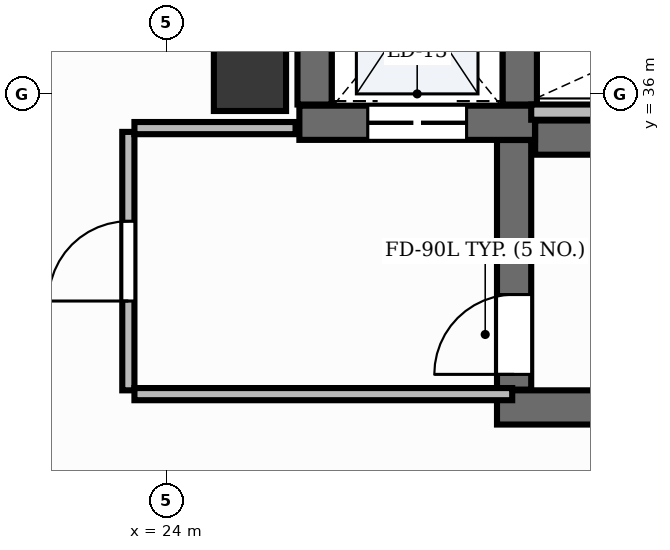
"""IFC4 building model, lengths in metres.
Left out: names, types, materials, properties, quantities, classifications, styles, units other than length and angle.
Written with IfcOpenShell. Run it as: python <this file> out.ifc"""

import sys

from ifc_helpers import new_model, si_unit, direction, frame, frame_2d, origin, origin_2d, place, context, subcontext, project, spatial, rectangle, extrude, element, fill, save


model = new_model("IFC4")
c1 = context("Model", 3, precision=1e-05, world=origin(), true_north=direction((0.0, 1.0)))
c2 = subcontext(c1, "Body", "Model", "MODEL_VIEW")
j1 = project(units=[si_unit("LENGTHUNIT", "METRE"), si_unit("PLANEANGLEUNIT", "RADIAN")], contexts=[c1])
p1 = place(None, origin())
s1 = spatial("IfcSite", under=j1, at=p1, CompositionType="ELEMENT")
p2 = place(p1, origin())
s2 = spatial("IfcBuilding", under=s1, at=p2, CompositionType="ELEMENT")
p3 = place(p2, frame((0.0, 0.0, 123.6)))
s3 = spatial("IfcBuildingStorey", under=s2, at=p3, CompositionType="ELEMENT", Elevation=123.6)
p4 = place(p3, frame((28.852, 35.425, 0.0), z_axis=(0.0, 0.0, 1.0), x_axis=(1.0, 0.0, 0.0)))
e1 = element("IfcWall", 1, at=p4, inside=s3, PredefinedType="SHEAR", context=c2, shape_type="SweptSolid", body=[
    extrude(rectangle(XDim=8.248, YDim=0.45, at=frame_2d((4.124, 0.0))), origin(), (0.0, 0.0, 1.0), 3.9),
])
p5 = place(p3, frame((28.35, 31.875, 0.0), z_axis=(0.0, 0.0, 1.0), x_axis=(1.0, 0.0, 0.0)))
e2 = element("IfcWall", 2, at=p5, inside=s3, PredefinedType="SHEAR", context=c2, shape_type="SweptSolid", body=[
    extrude(rectangle(XDim=8.75, YDim=0.45, at=frame_2d((4.375, 0.0))), origin(), (0.0, 0.0, 1.0), 3.9),
])
p6 = place(p3, frame((28.575, 32.11, 0.0), z_axis=(0.0, 0.0, 1.0), x_axis=(0.0, 1.0, 0.0)))
e3 = element("IfcWall", 3, at=p6, inside=s3, PredefinedType="SHEAR", context=c2, shape_type="SweptSolid", body=[
    extrude(rectangle(XDim=3.283, YDim=0.45, at=frame_2d((1.642, 0.0))), origin(), (0.0, 0.0, 1.0), 3.9),
])
p7 = place(p6, frame((0.2, 0.0, 0.0)))
e4 = element("IfcOpeningElement", 4, at=p7, cuts=e3, PredefinedType="OPENING", context=c2, shape_type="SweptSolid", body=[
    extrude(rectangle(XDim=1.05, YDim=2.15, at=frame_2d((0.525, 1.075))), frame((0.0, 0.24, 0.0), z_axis=(0.0, -1.0, 0.0), x_axis=(1.0, 0.0, 0.0)), (0.0, 0.0, 1.0), 0.48),
])
p8 = place(p3, frame((25.75, 35.62, 0.0), z_axis=(0.0, 0.0, 1.0), x_axis=(1.0, 0.0, 0.0)))
e5 = element("IfcWall", 5, at=p8, inside=s3, PredefinedType="SHEAR", context=c2, shape_type="SweptSolid", body=[
    extrude(rectangle(XDim=3.1, YDim=0.45, at=frame_2d((1.55, 0.0))), origin(), (0.0, 0.0, 1.0), 3.9),
])
p9 = place(p8, frame((0.9, 0.0, 0.0)))
e6 = element("IfcOpeningElement", 6, at=p9, cuts=e5, PredefinedType="OPENING", context=c2, shape_type="SweptSolid", body=[
    extrude(rectangle(XDim=1.3, YDim=2.2, at=frame_2d((0.65, 1.1))), frame((0.0, 0.24, 0.0), z_axis=(0.0, -1.0, 0.0), x_axis=(1.0, 0.0, 0.0)), (0.0, 0.0, 1.0), 0.48),
])
for number, where, z_axis, x_axis in (
    (7, (25.95, 35.86, 0.0), (0.0, 0.0, 1.0), (0.0, 1.0, 0.0)),
    (8, (28.65, 35.86, 0.0), (0.0, 0.0, 1.0), (0.0, 1.0, 0.0)),
):
    element("IfcWall", number, at=place(p3, frame(where, z_axis=z_axis, x_axis=x_axis)), inside=s3, PredefinedType="SHEAR", context=c2, shape_type="SweptSolid", body=[
        extrude(rectangle(XDim=2.7, YDim=0.45, at=frame_2d((1.35, 0.0))), origin(), (0.0, 0.0, 1.0), 3.9),
    ])
p10 = place(p3, frame((25.1, 36.25, -0.0), z_axis=(0.0, 0.0, 1.0), x_axis=(1.0, 0.0, 0.0)))
e9 = element("IfcColumn", 9, at=p10, inside=s3, PredefinedType="PILASTER", context=c2, shape_type="SweptSolid", body=[
    extrude(rectangle(XDim=0.95, YDim=0.95, at=origin_2d()), origin(), (0.0, 0.0, 1.0), 3.901),
])
p11 = place(p3, frame((28.8, 35.76, 0.0), z_axis=(0.0, 0.0, 1.0), x_axis=(1.0, 0.0, 0.0)))
e10 = element("IfcWall", 10, at=p11, inside=s3, PredefinedType="PARTITIONING", context=c2, shape_type="SweptSolid", body=[
    extrude(rectangle(XDim=4.57, YDim=0.2, at=frame_2d((2.285, 0.0))), origin(), (0.0, 0.0, 1.0), 2.91),
])
p12 = place(p3, frame((23.5, 32.1, 0.0), z_axis=(0.0, 0.0, 1.0), x_axis=(0.0, 1.0, 0.0)))
e11 = element("IfcWall", 11, at=p12, inside=s3, PredefinedType="PARTITIONING", context=c2, shape_type="SweptSolid", body=[
    extrude(rectangle(XDim=3.4, YDim=0.16, at=frame_2d((1.7, 0.0))), origin(), (0.0, 0.0, 1.0), 2.91),
])
p13 = place(p12, frame((1.175, 0.0, 0.0)))
e12 = element("IfcOpeningElement", 12, at=p13, cuts=e11, PredefinedType="OPENING", context=c2, shape_type="SweptSolid", body=[
    extrude(rectangle(XDim=1.05, YDim=2.15, at=frame_2d((0.525, 1.075))), frame((0.0, 0.095, 0.0), z_axis=(0.0, -1.0, 0.0), x_axis=(1.0, 0.0, 0.0)), (0.0, 0.0, 1.0), 0.19),
])
p14 = place(p3, frame((23.58, 32.05, 0.0), z_axis=(0.0, 0.0, 1.0), x_axis=(1.0, 0.0, 0.0)))
e13 = element("IfcWall", 13, at=p14, inside=s3, PredefinedType="PARTITIONING", context=c2, shape_type="SweptSolid", body=[
    extrude(rectangle(XDim=4.97, YDim=0.16, at=frame_2d((2.485, 0.0))), origin(), (0.0, 0.0, 1.0), 2.91),
])
p15 = place(p3, frame((23.58, 35.55, 0.0), z_axis=(0.0, 0.0, 1.0), x_axis=(1.0, 0.0, 0.0)))
e14 = element("IfcWall", 14, at=p15, inside=s3, PredefinedType="PARTITIONING", context=c2, shape_type="SweptSolid", body=[
    extrude(rectangle(XDim=2.12, YDim=0.16, at=frame_2d((1.06, 0.0))), origin(), (0.0, 0.0, 1.0), 2.91),
])
p16 = place(p7, origin())
e15 = element("IfcDoor", 15, at=p16, inside=s3, OperationType="SINGLE_SWING_LEFT", PredefinedType="DOOR", context=c2, shape_type="SweptSolid", body=[
    extrude(rectangle(XDim=1.05, YDim=2.15, at=frame_2d((0.525, 1.075))), frame((0.0, 0.025, 0.0), z_axis=(0.0, -1.0, 0.0), x_axis=(1.0, 0.0, 0.0)), (0.0, 0.0, 1.0), 0.05),
])
fill(e4, e15)
p17 = place(p9, origin())
e16 = element("IfcDoor", 16, at=p17, inside=s3, OperationType="DOUBLE_DOOR_SLIDING", PredefinedType="DOOR", context=c2, shape_type="SweptSolid", body=[
    extrude(rectangle(XDim=1.3, YDim=2.2, at=frame_2d((0.65, 1.1))), frame((0.0, 0.025, 0.0), z_axis=(0.0, -1.0, 0.0), x_axis=(1.0, 0.0, 0.0)), (0.0, 0.0, 1.0), 0.05),
])
fill(e6, e16)
p18 = place(p13, origin())
e17 = element("IfcDoor", 17, at=p18, inside=s3, OperationType="SINGLE_SWING_LEFT", PredefinedType="DOOR", context=c2, shape_type="SweptSolid", body=[
    extrude(rectangle(XDim=1.05, YDim=2.15, at=frame_2d((0.525, 1.075))), frame((0.0, 0.025, 0.0), z_axis=(0.0, -1.0, 0.0), x_axis=(1.0, 0.0, 0.0)), (0.0, 0.0, 1.0), 0.05),
])
fill(e12, e17)
save(model, sys.argv[1])
